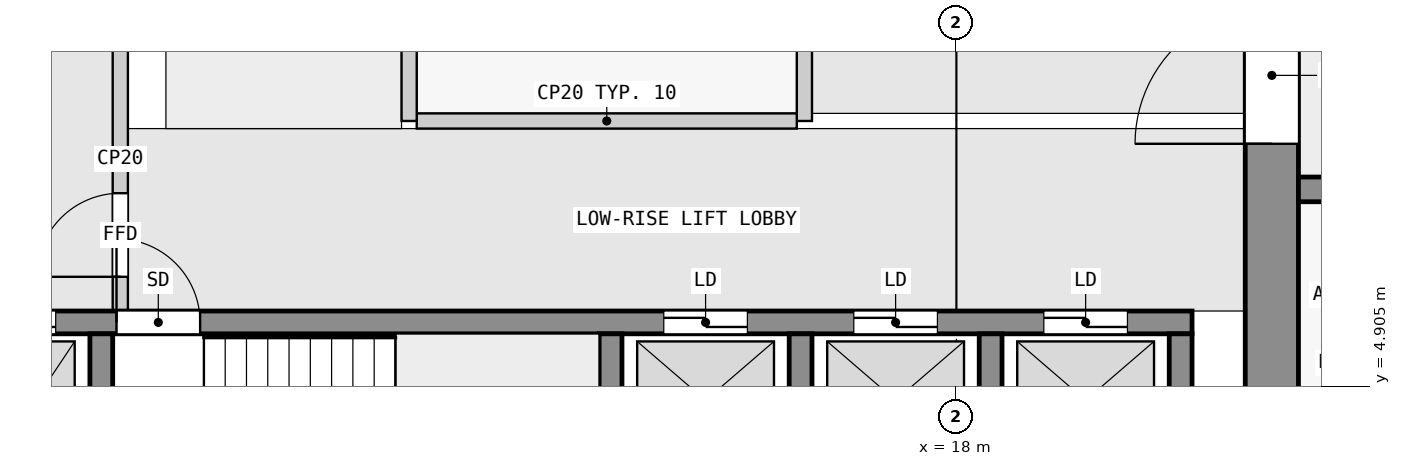
"""IFC4 building model, lengths in metres.
Left out: names, types, materials, properties, quantities, classifications, styles, units other than length and angle.
Written with IfcOpenShell. Run it as: python <this file> out.ifc"""

import sys

from ifc_helpers import new_model, si_unit, direction, frame, frame_2d, origin, place, context, subcontext, project, spatial, rectangle, extrude, element, fill, save


model = new_model("IFC4")
c1 = context("Model", 3, precision=1e-05, world=origin(), true_north=direction((0.0, 1.0)))
c2 = subcontext(c1, "Body", "Model", "MODEL_VIEW")
j1 = project(units=[si_unit("LENGTHUNIT", "METRE"), si_unit("PLANEANGLEUNIT", "RADIAN")], contexts=[c1])
p1 = place(None, origin())
s1 = spatial("IfcSite", under=j1, at=p1, CompositionType="ELEMENT")
p2 = place(p1, origin())
s2 = spatial("IfcBuilding", under=s1, at=p2, CompositionType="ELEMENT")
p3 = place(p2, frame((0.0, 0.0, 81.8)))
s3 = spatial("IfcBuildingStorey", under=s2, at=p3, CompositionType="ELEMENT", Elevation=81.8)
p4 = place(p3, frame((22.15, 2.5, 0.0), z_axis=(0.0, 0.0, 1.0), x_axis=(0.0, 1.0, 0.0)))
e1 = element("IfcWall", 1, at=p4, inside=s3, PredefinedType="SHEAR", context=c2, shape_type="SweptSolid", body=[
    extrude(rectangle(XDim=14.8, YDim=0.7, at=frame_2d((7.4, 0.0))), origin(), (0.0, 0.0, 1.0), 3.25),
])
p5 = place(p4, frame((5.6, 0.0, 0.0)))
e2 = element("IfcOpeningElement", 2, at=p5, cuts=e1, PredefinedType="OPENING", context=c2, shape_type="SweptSolid", body=[
    extrude(rectangle(XDim=1.8, YDim=2.1, at=frame_2d((0.9, 1.05))), frame((0.0, 0.36, 0.0), z_axis=(0.0, -1.0, 0.0), x_axis=(1.0, 0.0, 0.0)), (0.0, 0.0, 1.0), 0.72),
])
for number, where, z_axis, x_axis in (
    (3, (6.75, 2.8, 0.0), (0.0, 0.0, 1.0), (0.0, 1.0, 0.0)),
    (4, (13.45, 2.8, 0.0), (0.0, 0.0, 1.0), (0.0, 1.0, 0.0)),
    (5, (15.95, 2.8, 0.0), (0.0, 0.0, 1.0), (0.0, 1.0, 0.0)),
    (6, (18.45, 2.8, 0.0), (0.0, 0.0, 1.0), (0.0, 1.0, 0.0)),
    (7, (20.95, 2.8, 0.0), (0.0, 0.0, 1.0), (0.0, 1.0, 0.0)),
):
    element("IfcWall", number, at=place(p3, frame(where, z_axis=z_axis, x_axis=x_axis)), inside=s3, PredefinedType="SHEAR", context=c2, shape_type="SweptSolid", body=[
        extrude(rectangle(XDim=2.8, YDim=0.3, at=frame_2d((1.4, 0.0))), origin(), (0.0, 0.0, 1.0), 3.25),
    ])
p6 = place(p3, frame((2.3, 5.75, 0.0), z_axis=(0.0, 0.0, 1.0), x_axis=(1.0, 0.0, 0.0)))
e8 = element("IfcWall", 8, at=p6, inside=s3, PredefinedType="SHEAR", context=c2, shape_type="SweptSolid", body=[
    extrude(rectangle(XDim=18.8, YDim=0.3, at=frame_2d((9.4, 0.0))), origin(), (0.0, 0.0, 1.0), 3.25),
])
p7 = place(p6, frame((4.65, 0.0, 0.0)))
e9 = element("IfcOpeningElement", 9, at=p7, cuts=e8, PredefinedType="OPENING", context=c2, shape_type="SweptSolid", body=[
    extrude(rectangle(XDim=1.1, YDim=2.1, at=frame_2d((0.55, 1.05))), frame((0.0, 0.16, 0.0), z_axis=(0.0, -1.0, 0.0), x_axis=(1.0, 0.0, 0.0)), (0.0, 0.0, 1.0), 0.32),
])
p8 = place(p6, frame((0.45, 0.0, 0.0)))
e10 = element("IfcOpeningElement", 10, at=p8, cuts=e8, PredefinedType="OPENING", context=c2, shape_type="SweptSolid", body=[
    extrude(rectangle(XDim=1.1, YDim=2.1, at=frame_2d((0.55, 1.05))), frame((0.0, 0.16, 0.0), z_axis=(0.0, -1.0, 0.0), x_axis=(1.0, 0.0, 0.0)), (0.0, 0.0, 1.0), 0.32),
])
p9 = place(p6, frame((2.75, 0.0, 0.0)))
e11 = element("IfcOpeningElement", 11, at=p9, cuts=e8, PredefinedType="OPENING", context=c2, shape_type="SweptSolid", body=[
    extrude(rectangle(XDim=1.1, YDim=2.1, at=frame_2d((0.55, 1.05))), frame((0.0, 0.16, 0.0), z_axis=(0.0, -1.0, 0.0), x_axis=(1.0, 0.0, 0.0)), (0.0, 0.0, 1.0), 0.32),
])
p10 = place(p6, frame((11.85, 0.0, 0.0)))
e12 = element("IfcOpeningElement", 12, at=p10, cuts=e8, PredefinedType="OPENING", context=c2, shape_type="SweptSolid", body=[
    extrude(rectangle(XDim=1.1, YDim=2.1, at=frame_2d((0.55, 1.05))), frame((0.0, 0.16, 0.0), z_axis=(0.0, -1.0, 0.0), x_axis=(1.0, 0.0, 0.0)), (0.0, 0.0, 1.0), 0.32),
])
p11 = place(p6, frame((14.35, 0.0, 0.0)))
e13 = element("IfcOpeningElement", 13, at=p11, cuts=e8, PredefinedType="OPENING", context=c2, shape_type="SweptSolid", body=[
    extrude(rectangle(XDim=1.1, YDim=2.1, at=frame_2d((0.55, 1.05))), frame((0.0, 0.16, 0.0), z_axis=(0.0, -1.0, 0.0), x_axis=(1.0, 0.0, 0.0)), (0.0, 0.0, 1.0), 0.32),
])
p12 = place(p6, frame((16.85, 0.0, 0.0)))
e14 = element("IfcOpeningElement", 14, at=p12, cuts=e8, PredefinedType="OPENING", context=c2, shape_type="SweptSolid", body=[
    extrude(rectangle(XDim=1.1, YDim=2.1, at=frame_2d((0.55, 1.05))), frame((0.0, 0.16, 0.0), z_axis=(0.0, -1.0, 0.0), x_axis=(1.0, 0.0, 0.0)), (0.0, 0.0, 1.0), 0.32),
])
p13 = place(p3, frame((22.5, 7.5, 0.0), z_axis=(0.0, 0.0, 1.0), x_axis=(1.0, 0.0, 0.0)))
e15 = element("IfcWall", 15, at=p13, inside=s3, PredefinedType="SHEAR", context=c2, shape_type="SweptSolid", body=[
    extrude(rectangle(XDim=22.5, YDim=0.325, at=frame_2d((11.25, 0.0))), origin(), (0.0, 0.0, 1.0), 3.25),
])
p14 = place(p13, frame((4.05, 0.0, 0.0)))
e16 = element("IfcOpeningElement", 16, at=p14, cuts=e15, PredefinedType="OPENING", context=c2, shape_type="SweptSolid", body=[
    extrude(rectangle(XDim=1.0, YDim=2.1, at=frame_2d((0.5, 1.05))), frame((0.0, 0.172, 0.0), z_axis=(0.0, -1.0, 0.0), x_axis=(1.0, 0.0, 0.0)), (0.0, 0.0, 1.0), 0.345),
])
p15 = place(p13, frame((13.05, 0.0, 0.0)))
e17 = element("IfcOpeningElement", 17, at=p15, cuts=e15, PredefinedType="OPENING", context=c2, shape_type="SweptSolid", body=[
    extrude(rectangle(XDim=1.0, YDim=2.1, at=frame_2d((0.5, 1.05))), frame((0.0, 0.172, 0.0), z_axis=(0.0, -1.0, 0.0), x_axis=(1.0, 0.0, 0.0)), (0.0, 0.0, 1.0), 0.345),
])
p16 = place(p13, frame((18.75, 0.0, 0.0)))
e18 = element("IfcOpeningElement", 18, at=p16, cuts=e15, PredefinedType="OPENING", context=c2, shape_type="SweptSolid", body=[
    extrude(rectangle(XDim=0.9, YDim=2.1, at=frame_2d((0.45, 1.05))), frame((0.0, 0.172, 0.0), z_axis=(0.0, -1.0, 0.0), x_axis=(1.0, 0.0, 0.0)), (0.0, 0.0, 1.0), 0.345),
])
p17 = place(p13, frame((20.95, 0.0, 0.0)))
e19 = element("IfcOpeningElement", 19, at=p17, cuts=e15, PredefinedType="OPENING", context=c2, shape_type="SweptSolid", body=[
    extrude(rectangle(XDim=1.0, YDim=2.1, at=frame_2d((0.5, 1.05))), frame((0.0, 0.172, 0.0), z_axis=(0.0, -1.0, 0.0), x_axis=(1.0, 0.0, 0.0)), (0.0, 0.0, 1.0), 0.345),
])
p18 = place(p3, frame((7.0, 5.9, 0.0), z_axis=(0.0, 0.0, 1.0), x_axis=(0.0, 1.0, 0.0)))
e20 = element("IfcWall", 20, at=p18, inside=s3, PredefinedType="PARTITIONING", context=c2, shape_type="SweptSolid", body=[
    extrude(rectangle(XDim=4.0, YDim=0.2, at=frame_2d((2.0, 0.0))), origin(), (0.0, 0.0, 1.0), 3.25),
])
p19 = place(p18, frame((0.45, 0.0, 0.0)))
e21 = element("IfcOpeningElement", 21, at=p19, cuts=e20, PredefinedType="OPENING", context=c2, shape_type="SweptSolid", body=[
    extrude(rectangle(XDim=1.1, YDim=2.1, at=frame_2d((0.55, 1.05))), frame((0.0, 0.11, 0.0), z_axis=(0.0, -1.0, 0.0), x_axis=(1.0, 0.0, 0.0)), (0.0, 0.0, 1.0), 0.22),
])
p20 = place(p3, frame((10.8, 8.4, 0.0), z_axis=(0.0, 0.0, 1.0), x_axis=(0.0, 1.0, 0.0)))
e22 = element("IfcWall", 22, at=p20, inside=s3, PredefinedType="PARTITIONING", context=c2, shape_type="SweptSolid", body=[
    extrude(rectangle(XDim=6.2, YDim=0.2, at=frame_2d((3.1, 0.0))), origin(), (0.0, 0.0, 1.0), 3.25),
])
p21 = place(p3, frame((10.9, 8.4, 0.0), z_axis=(0.0, 0.0, 1.0), x_axis=(1.0, 0.0, 0.0)))
e23 = element("IfcWall", 23, at=p21, inside=s3, PredefinedType="PARTITIONING", context=c2, shape_type="SweptSolid", body=[
    extrude(rectangle(XDim=5.0, YDim=0.2, at=frame_2d((2.5, 0.0))), origin(), (0.0, 0.0, 1.0), 3.25),
])
p22 = place(p3, frame((16.0, 8.4, 0.0), z_axis=(0.0, 0.0, 1.0), x_axis=(0.0, 1.0, 0.0)))
e24 = element("IfcWall", 24, at=p22, inside=s3, PredefinedType="PARTITIONING", context=c2, shape_type="SweptSolid", body=[
    extrude(rectangle(XDim=6.2, YDim=0.2, at=frame_2d((3.1, 0.0))), origin(), (0.0, 0.0, 1.0), 3.25),
])
p23 = place(p22, frame((3.15, 0.0, 0.0)))
e25 = element("IfcOpeningElement", 25, at=p23, cuts=e24, PredefinedType="OPENING", context=c2, shape_type="SweptSolid", body=[
    extrude(rectangle(XDim=0.9, YDim=2.1, at=frame_2d((0.45, 1.05))), frame((0.0, 0.11, 0.0), z_axis=(0.0, -1.0, 0.0), x_axis=(1.0, 0.0, 0.0)), (0.0, 0.0, 1.0), 0.22),
])
p24 = place(p19, origin())
e26 = element("IfcDoor", 26, at=p24, inside=s3, OperationType="SINGLE_SWING_LEFT", PredefinedType="DOOR", context=c2, shape_type="SweptSolid", body=[
    extrude(rectangle(XDim=1.1, YDim=2.1, at=frame_2d((0.55, 1.05))), frame((0.0, 0.025, 0.0), z_axis=(0.0, -1.0, 0.0), x_axis=(1.0, 0.0, 0.0)), (0.0, 0.0, 1.0), 0.05),
])
fill(e21, e26)
p25 = place(p7, origin())
e27 = element("IfcDoor", 27, at=p25, inside=s3, OperationType="SINGLE_SWING_LEFT", PredefinedType="DOOR", context=c2, shape_type="SweptSolid", body=[
    extrude(rectangle(XDim=1.1, YDim=2.1, at=frame_2d((0.55, 1.05))), frame((0.0, 0.025, 0.0), z_axis=(0.0, -1.0, 0.0), x_axis=(1.0, 0.0, 0.0)), (0.0, 0.0, 1.0), 0.05),
])
fill(e9, e27)
p26 = place(p9, origin())
e28 = element("IfcDoor", 28, at=p26, inside=s3, OperationType="DOUBLE_DOOR_SLIDING", PredefinedType="DOOR", context=c2, shape_type="SweptSolid", body=[
    extrude(rectangle(XDim=1.1, YDim=2.1, at=frame_2d((0.55, 1.05))), frame((0.0, 0.025, 0.0), z_axis=(0.0, -1.0, 0.0), x_axis=(1.0, 0.0, 0.0)), (0.0, 0.0, 1.0), 0.05),
])
fill(e11, e28)
p27 = place(p10, origin())
e29 = element("IfcDoor", 29, at=p27, inside=s3, OperationType="DOUBLE_DOOR_SLIDING", PredefinedType="DOOR", context=c2, shape_type="SweptSolid", body=[
    extrude(rectangle(XDim=1.1, YDim=2.1, at=frame_2d((0.55, 1.05))), frame((0.0, 0.025, 0.0), z_axis=(0.0, -1.0, 0.0), x_axis=(1.0, 0.0, 0.0)), (0.0, 0.0, 1.0), 0.05),
])
fill(e12, e29)
p28 = place(p11, origin())
e30 = element("IfcDoor", 30, at=p28, inside=s3, OperationType="DOUBLE_DOOR_SLIDING", PredefinedType="DOOR", context=c2, shape_type="SweptSolid", body=[
    extrude(rectangle(XDim=1.1, YDim=2.1, at=frame_2d((0.55, 1.05))), frame((0.0, 0.025, 0.0), z_axis=(0.0, -1.0, 0.0), x_axis=(1.0, 0.0, 0.0)), (0.0, 0.0, 1.0), 0.05),
])
fill(e13, e30)
p29 = place(p12, origin())
e31 = element("IfcDoor", 31, at=p29, inside=s3, OperationType="DOUBLE_DOOR_SLIDING", PredefinedType="DOOR", context=c2, shape_type="SweptSolid", body=[
    extrude(rectangle(XDim=1.1, YDim=2.1, at=frame_2d((0.55, 1.05))), frame((0.0, 0.025, 0.0), z_axis=(0.0, -1.0, 0.0), x_axis=(1.0, 0.0, 0.0)), (0.0, 0.0, 1.0), 0.05),
])
fill(e14, e31)
p30 = place(p5, origin())
e32 = element("IfcDoor", 32, at=p30, inside=s3, OperationType="DOUBLE_DOOR_SINGLE_SWING", PredefinedType="DOOR", context=c2, shape_type="SweptSolid", body=[
    extrude(rectangle(XDim=1.8, YDim=2.1, at=frame_2d((0.9, 1.05))), frame((0.0, 0.025, 0.0), z_axis=(0.0, -1.0, 0.0), x_axis=(1.0, 0.0, 0.0)), (0.0, 0.0, 1.0), 0.05),
])
fill(e2, e32)
save(model, sys.argv[1])
